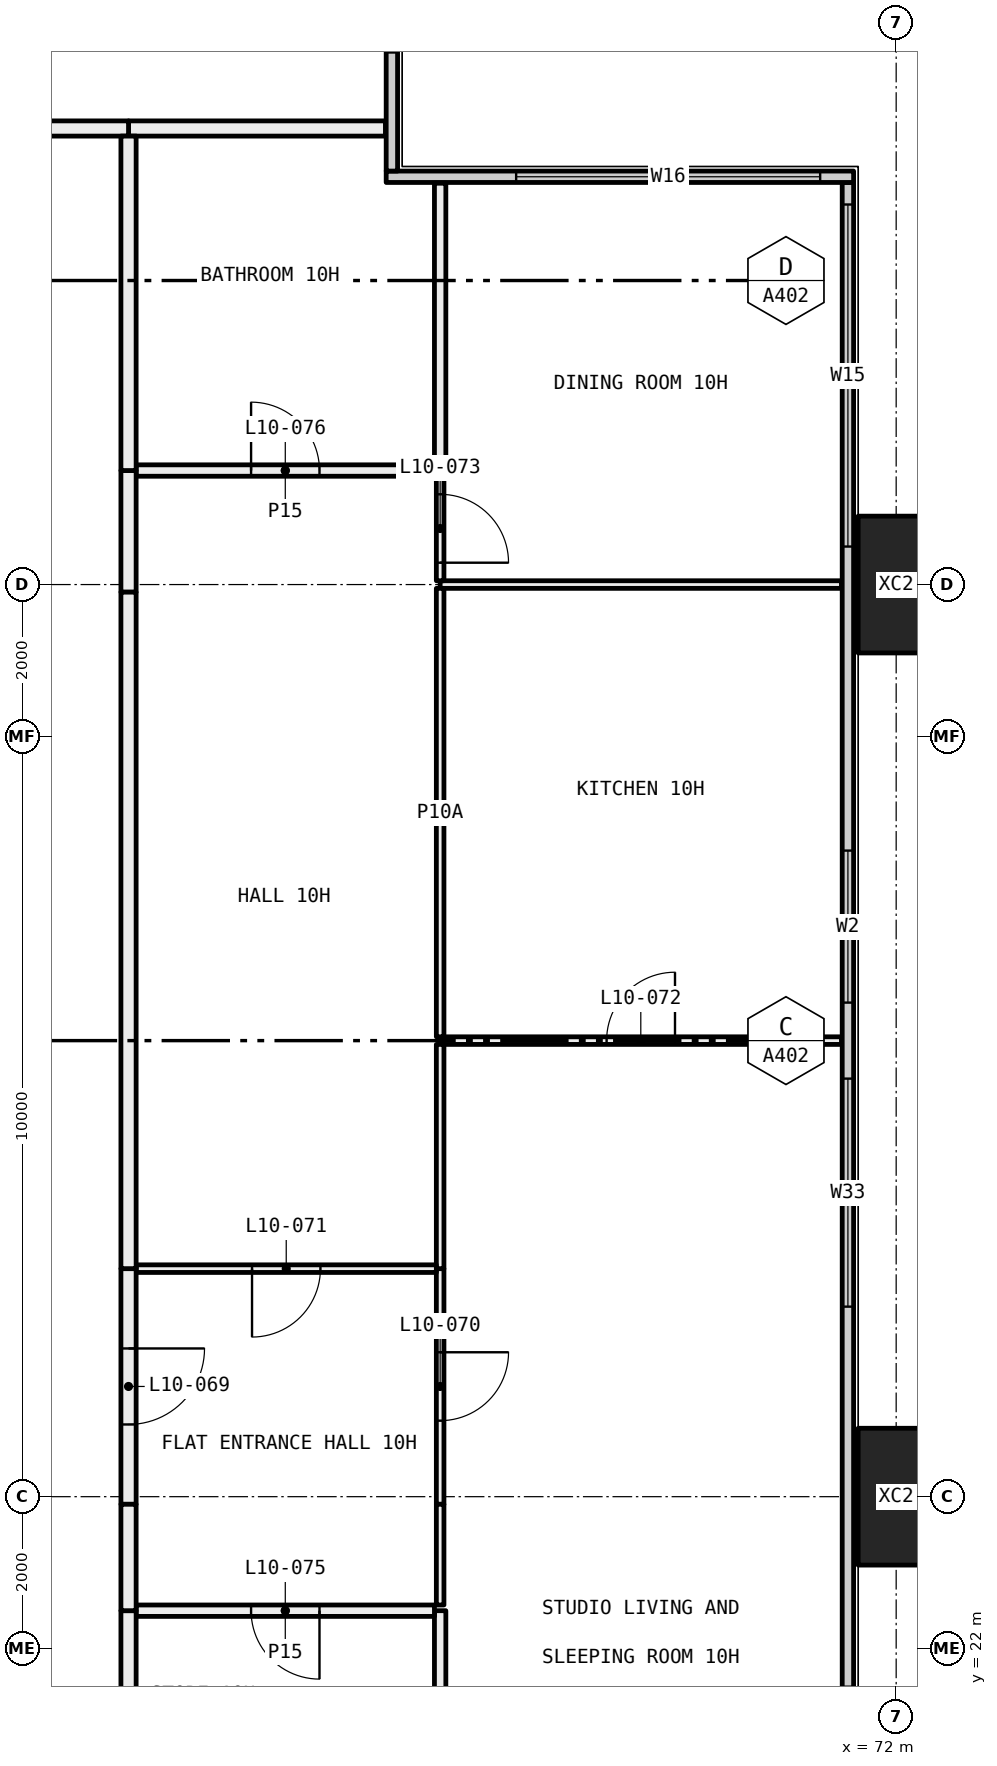
"""IFC4 building model, lengths in metres.
Left out: names, types, materials, properties, quantities, classifications, styles, units other than length and angle.
Written with IfcOpenShell. Run it as: python <this file> out.ifc"""

import sys

from ifc_helpers import new_model, si_unit, direction, frame, frame_2d, origin, origin_2d, place, context, subcontext, project, spatial, rectangle, hollow_rectangle, extrude, element, fill, save


model = new_model("IFC4")
c1 = context("Model", 3, precision=1e-05, world=origin(), true_north=direction((0.0, 1.0)))
c2 = subcontext(c1, "Body", "Model", "MODEL_VIEW")
j1 = project(units=[si_unit("LENGTHUNIT", "METRE"), si_unit("PLANEANGLEUNIT", "RADIAN")], contexts=[c1])
p1 = place(None, origin())
s1 = spatial("IfcSite", under=j1, at=p1, CompositionType="ELEMENT")
p2 = place(p1, origin())
s2 = spatial("IfcBuilding", under=s1, at=p2, CompositionType="ELEMENT")
p3 = place(p2, frame((0.0, 0.0, 47.25)))
s3 = spatial("IfcBuildingStorey", under=s2, at=p3, CompositionType="ELEMENT", Elevation=47.25)
for number, where, z_axis, x_axis in (
    (1, (72.0, 24.0, -0.4), (0.0, 0.0, 1.0), (0.0, 1.0, 0.0)),
    (2, (72.0, 36.0, -0.4), (0.0, 0.0, 1.0), (0.0, 1.0, 0.0)),
):
    element("IfcColumn", number, at=place(p3, frame(where, z_axis=z_axis, x_axis=x_axis)), inside=s3, PredefinedType="COLUMN", context=c2, shape_type="SweptSolid", body=[
        extrude(hollow_rectangle(XDim=1.8, YDim=1.0, WallThickness=0.07, at=origin_2d()), origin(), (0.0, 0.0, 1.0), 3.45),
    ])
p4 = place(p3, frame((71.365, 6.71, 0.0), z_axis=(0.0, 0.0, 1.0), x_axis=(0.0, 1.0, 0.0)))
e3 = element("IfcWall", 3, at=p4, inside=s3, PredefinedType="ELEMENTEDWALL", context=c2, shape_type="SweptSolid", body=[
    extrude(rectangle(XDim=34.58, YDim=0.15, at=frame_2d((17.29, 0.0))), origin(), (0.0, 0.0, 1.0), 3.05),
])
p5 = place(p4, frame((0.29, 0.0, 0.45)))
e4 = element("IfcOpeningElement", 4, at=p5, cuts=e3, PredefinedType="OPENING", context=c2, shape_type="SweptSolid", body=[
    extrude(rectangle(XDim=4.5, YDim=2.55, at=frame_2d((2.25, 1.275))), frame((0.0, 0.085, 0.0), z_axis=(0.0, -1.0, 0.0), x_axis=(1.0, 0.0, 0.0)), (0.0, 0.0, 1.0), 0.17),
])
p6 = place(p4, frame((7.79, 0.0, 0.45)))
e5 = element("IfcOpeningElement", 5, at=p6, cuts=e3, PredefinedType="OPENING", context=c2, shape_type="SweptSolid", body=[
    extrude(rectangle(XDim=3.0, YDim=2.55, at=frame_2d((1.5, 1.275))), frame((0.0, 0.085, 0.0), z_axis=(0.0, -1.0, 0.0), x_axis=(1.0, 0.0, 0.0)), (0.0, 0.0, 1.0), 0.17),
])
p7 = place(p4, frame((11.79, 0.0, 0.45)))
e6 = element("IfcOpeningElement", 6, at=p7, cuts=e3, PredefinedType="OPENING", context=c2, shape_type="SweptSolid", body=[
    extrude(rectangle(XDim=3.0, YDim=2.55, at=frame_2d((1.5, 1.275))), frame((0.0, 0.085, 0.0), z_axis=(0.0, -1.0, 0.0), x_axis=(1.0, 0.0, 0.0)), (0.0, 0.0, 1.0), 0.17),
])
p8 = place(p4, frame((19.79, 0.0, 0.45)))
e7 = element("IfcOpeningElement", 7, at=p8, cuts=e3, PredefinedType="OPENING", context=c2, shape_type="SweptSolid", body=[
    extrude(rectangle(XDim=3.0, YDim=2.55, at=frame_2d((1.5, 1.275))), frame((0.0, 0.085, 0.0), z_axis=(0.0, -1.0, 0.0), x_axis=(1.0, 0.0, 0.0)), (0.0, 0.0, 1.0), 0.17),
])
p9 = place(p4, frame((23.79, 0.0, 0.45)))
e8 = element("IfcOpeningElement", 8, at=p9, cuts=e3, PredefinedType="OPENING", context=c2, shape_type="SweptSolid", body=[
    extrude(rectangle(XDim=2.0, YDim=2.55, at=frame_2d((1.0, 1.275))), frame((0.0, 0.085, 0.0), z_axis=(0.0, -1.0, 0.0), x_axis=(1.0, 0.0, 0.0)), (0.0, 0.0, 1.0), 0.17),
])
p10 = place(p4, frame((29.79, 0.0, 0.45)))
e9 = element("IfcOpeningElement", 9, at=p10, cuts=e3, PredefinedType="OPENING", context=c2, shape_type="SweptSolid", body=[
    extrude(rectangle(XDim=4.5, YDim=2.55, at=frame_2d((2.25, 1.275))), frame((0.0, 0.085, 0.0), z_axis=(0.0, -1.0, 0.0), x_axis=(1.0, 0.0, 0.0)), (0.0, 0.0, 1.0), 0.17),
])
p11 = place(p3, frame((65.29, 41.365, 0.0), z_axis=(0.0, 0.0, 1.0), x_axis=(1.0, 0.0, 0.0)))
e10 = element("IfcWall", 10, at=p11, inside=s3, PredefinedType="ELEMENTEDWALL", context=c2, shape_type="SweptSolid", body=[
    extrude(rectangle(XDim=6.15, YDim=0.15, at=frame_2d((3.075, 0.0))), origin(), (0.0, 0.0, 1.0), 3.05),
])
p12 = place(p11, frame((1.71, 0.0, 0.45)))
e11 = element("IfcOpeningElement", 11, at=p12, cuts=e10, PredefinedType="OPENING", context=c2, shape_type="SweptSolid", body=[
    extrude(rectangle(XDim=4.0, YDim=2.55, at=frame_2d((2.0, 1.275))), frame((0.0, 0.085, 0.0), z_axis=(0.0, -1.0, 0.0), x_axis=(1.0, 0.0, 0.0)), (0.0, 0.0, 1.0), 0.17),
])
p13 = place(p3, frame((65.365, 41.44, 0.0), z_axis=(0.0, 0.0, 1.0), x_axis=(0.0, 1.0, 0.0)))
e12 = element("IfcWall", 12, at=p13, inside=s3, PredefinedType="ELEMENTEDWALL", context=c2, shape_type="SweptSolid", body=[
    extrude(rectangle(XDim=5.85, YDim=0.15, at=frame_2d((2.925, 0.0))), origin(), (0.0, 0.0, 1.0), 3.05),
])
p14 = place(p13, frame((1.56, 0.0, 0.45)))
e13 = element("IfcOpeningElement", 13, at=p14, cuts=e12, PredefinedType="OPENING", context=c2, shape_type="SweptSolid", body=[
    extrude(rectangle(XDim=4.0, YDim=2.55, at=frame_2d((2.0, 1.275))), frame((0.0, 0.085, 0.0), z_axis=(0.0, -1.0, 0.0), x_axis=(1.0, 0.0, 0.0)), (0.0, 0.0, 1.0), 0.17),
])
p15 = place(p3, frame((61.9, 42.0, 0.0), z_axis=(0.0, 0.0, 1.0), x_axis=(1.0, 0.0, 0.0)))
e14 = element("IfcWall", 14, at=p15, inside=s3, PredefinedType="PARTITIONING", context=c2, shape_type="SweptSolid", body=[
    extrude(rectangle(XDim=3.38, YDim=0.2, at=frame_2d((1.69, 0.0))), origin(), (0.0, 0.0, 1.0), 3.05),
])
p16 = place(p3, frame((60.0, 42.0, 0.0), z_axis=(0.0, 0.0, 1.0), x_axis=(1.0, 0.0, 0.0)))
e15 = element("IfcWall", 15, at=p16, inside=s3, PredefinedType="PARTITIONING", context=c2, shape_type="SweptSolid", body=[
    extrude(rectangle(XDim=1.9, YDim=0.2, at=frame_2d((0.95, 0.0))), origin(), (0.0, 0.0, 1.0), 3.05),
])
p17 = place(p3, frame((71.28, 30.0, 0.0), z_axis=(0.0, 0.0, 1.0), x_axis=(-1.0, 0.0, 0.0)))
e16 = element("IfcWall", 16, at=p17, inside=s3, PredefinedType="PARTITIONING", context=c2, shape_type="SweptSolid", body=[
    extrude(rectangle(XDim=5.28, YDim=0.1, at=frame_2d((2.64, 0.0))), origin(), (0.0, 0.0, 1.0), 3.05),
])
p18 = place(p17, frame((2.19, 0.0, 0.0)))
e17 = element("IfcOpeningElement", 17, at=p18, cuts=e16, PredefinedType="OPENING", context=c2, shape_type="SweptSolid", body=[
    extrude(rectangle(XDim=0.9, YDim=2.1, at=frame_2d((0.45, 1.05))), frame((0.0, 0.06, 0.0), z_axis=(0.0, -1.0, 0.0), x_axis=(1.0, 0.0, 0.0)), (0.0, 0.0, 1.0), 0.12),
])
p19 = place(p3, frame((66.0, 22.5, 0.0), z_axis=(0.0, 0.0, 1.0), x_axis=(0.0, -1.0, 0.0)))
e18 = element("IfcWall", 18, at=p19, inside=s3, PredefinedType="PARTITIONING", context=c2, shape_type="SweptSolid", body=[
    extrude(rectangle(XDim=2.1, YDim=0.15, at=frame_2d((1.05, 0.0))), origin(), (0.0, 0.0, 1.0), 3.05),
])
p20 = place(p3, frame((66.0, 27.0, 0.0), z_axis=(0.0, 0.0, 1.0), x_axis=(0.0, -1.0, 0.0)))
e19 = element("IfcWall", 19, at=p20, inside=s3, PredefinedType="PARTITIONING", context=c2, shape_type="SweptSolid", body=[
    extrude(rectangle(XDim=3.1, YDim=0.1, at=frame_2d((1.55, 0.0))), origin(), (0.0, 0.0, 1.0), 2.45),
])
p21 = place(p20, frame((1.1, 0.0, 0.0)))
e20 = element("IfcOpeningElement", 20, at=p21, cuts=e19, PredefinedType="OPENING", context=c2, shape_type="SweptSolid", body=[
    extrude(rectangle(XDim=0.9, YDim=2.1, at=frame_2d((0.45, 1.05))), frame((0.0, 0.06, 0.0), z_axis=(0.0, -1.0, 0.0), x_axis=(1.0, 0.0, 0.0)), (0.0, 0.0, 1.0), 0.12),
])
p22 = place(p3, frame((66.0, 23.9, 0.0), z_axis=(0.0, 0.0, 1.0), x_axis=(0.0, -1.0, 0.0)))
e21 = element("IfcWall", 21, at=p22, inside=s3, PredefinedType="PARTITIONING", context=c2, shape_type="SweptSolid", body=[
    extrude(rectangle(XDim=1.325, YDim=0.1, at=frame_2d((0.663, 0.0))), origin(), (0.0, 0.0, 1.0), 3.05),
])
p23 = place(p3, frame((66.0, 29.95, 0.0), z_axis=(0.0, 0.0, 1.0), x_axis=(0.0, -1.0, 0.0)))
e22 = element("IfcWall", 22, at=p23, inside=s3, PredefinedType="PARTITIONING", context=c2, shape_type="SweptSolid", body=[
    extrude(rectangle(XDim=2.95, YDim=0.1, at=frame_2d((1.475, 0.0))), origin(), (0.0, 0.0, 1.0), 3.05),
])
p24 = place(p3, frame((71.28, 36.0, 0.0), z_axis=(0.0, 0.0, 1.0), x_axis=(-1.0, 0.0, 0.0)))
e23 = element("IfcWall", 23, at=p24, inside=s3, PredefinedType="PARTITIONING", context=c2, shape_type="SweptSolid", body=[
    extrude(rectangle(XDim=5.28, YDim=0.1, at=frame_2d((2.64, 0.0))), origin(), (0.0, 0.0, 1.0), 2.45),
])
p25 = place(p3, frame((66.0, 35.95, 0.0), z_axis=(0.0, 0.0, 1.0), x_axis=(0.0, -1.0, 0.0)))
e24 = element("IfcWall", 24, at=p25, inside=s3, PredefinedType="PARTITIONING", context=c2, shape_type="SweptSolid", body=[
    extrude(rectangle(XDim=5.9, YDim=0.1, at=frame_2d((2.95, 0.0))), origin(), (0.0, 0.0, 1.0), 2.45),
])
p26 = place(p3, frame((66.0, 37.425, 0.0), z_axis=(0.0, 0.0, 1.0), x_axis=(0.0, -1.0, 0.0)))
e25 = element("IfcWall", 25, at=p26, inside=s3, PredefinedType="PARTITIONING", context=c2, shape_type="SweptSolid", body=[
    extrude(rectangle(XDim=1.375, YDim=0.1, at=frame_2d((0.688, 0.0))), origin(), (0.0, 0.0, 1.0), 2.45),
])
p27 = place(p26, frame((0.238, 0.0, 0.0)))
e26 = element("IfcOpeningElement", 26, at=p27, cuts=e25, PredefinedType="OPENING", context=c2, shape_type="SweptSolid", body=[
    extrude(rectangle(XDim=0.9, YDim=2.1, at=frame_2d((0.45, 1.05))), frame((0.0, 0.06, 0.0), z_axis=(0.0, -1.0, 0.0), x_axis=(1.0, 0.0, 0.0)), (0.0, 0.0, 1.0), 0.12),
])
p28 = place(p3, frame((66.0, 41.28, 0.0), z_axis=(0.0, 0.0, 1.0), x_axis=(0.0, -1.0, 0.0)))
e27 = element("IfcWall", 27, at=p28, inside=s3, PredefinedType="PARTITIONING", context=c2, shape_type="SweptSolid", body=[
    extrude(rectangle(XDim=3.78, YDim=0.15, at=frame_2d((1.89, 0.0))), origin(), (0.0, 0.0, 1.0), 3.05),
])
p29 = place(p3, frame((65.925, 22.5, 0.0), z_axis=(0.0, 0.0, 1.0), x_axis=(-1.0, 0.0, 0.0)))
e28 = element("IfcWall", 28, at=p29, inside=s3, PredefinedType="PARTITIONING", context=c2, shape_type="SweptSolid", body=[
    extrude(rectangle(XDim=3.925, YDim=0.15, at=frame_2d((1.962, 0.0))), origin(), (0.0, 0.0, 1.0), 3.05),
])
p30 = place(p29, frame((1.512, 0.0, 0.0)))
e29 = element("IfcOpeningElement", 29, at=p30, cuts=e28, PredefinedType="OPENING", context=c2, shape_type="SweptSolid", body=[
    extrude(rectangle(XDim=0.9, YDim=2.1, at=frame_2d((0.45, 1.05))), frame((0.0, 0.085, 0.0), z_axis=(0.0, -1.0, 0.0), x_axis=(1.0, 0.0, 0.0)), (0.0, 0.0, 1.0), 0.17),
])
p31 = place(p3, frame((61.9, 22.5, 0.0), z_axis=(0.0, 0.0, 1.0), x_axis=(0.0, -1.0, 0.0)))
e30 = element("IfcWall", 30, at=p31, inside=s3, PredefinedType="PARTITIONING", context=c2, shape_type="SweptSolid", body=[
    extrude(rectangle(XDim=2.1, YDim=0.2, at=frame_2d((1.05, 0.0))), origin(), (0.0, 0.0, 1.0), 3.05),
])
p32 = place(p3, frame((65.95, 27.0, 0.0), z_axis=(0.0, 0.0, 1.0), x_axis=(-1.0, 0.0, 0.0)))
e31 = element("IfcWall", 31, at=p32, inside=s3, PredefinedType="PARTITIONING", context=c2, shape_type="SweptSolid", body=[
    extrude(rectangle(XDim=3.95, YDim=0.1, at=frame_2d((1.975, 0.0))), origin(), (0.0, 0.0, 1.0), 3.05),
])
p33 = place(p32, frame((1.525, 0.0, 0.0)))
e32 = element("IfcOpeningElement", 32, at=p33, cuts=e31, PredefinedType="OPENING", context=c2, shape_type="SweptSolid", body=[
    extrude(rectangle(XDim=0.9, YDim=2.1, at=frame_2d((0.45, 1.05))), frame((0.0, 0.06, 0.0), z_axis=(0.0, -1.0, 0.0), x_axis=(1.0, 0.0, 0.0)), (0.0, 0.0, 1.0), 0.12),
])
p34 = place(p3, frame((61.9, 27.0, 0.0), z_axis=(0.0, 0.0, 1.0), x_axis=(0.0, -1.0, 0.0)))
e33 = element("IfcWall", 33, at=p34, inside=s3, PredefinedType="PARTITIONING", context=c2, shape_type="SweptSolid", body=[
    extrude(rectangle(XDim=3.1, YDim=0.2, at=frame_2d((1.55, 0.0))), origin(), (0.0, 0.0, 1.0), 2.45),
])
p35 = place(p34, frame((1.05, 0.0, 0.0)))
e34 = element("IfcOpeningElement", 34, at=p35, cuts=e33, PredefinedType="OPENING", context=c2, shape_type="SweptSolid", body=[
    extrude(rectangle(XDim=1.0, YDim=2.1, at=frame_2d((0.5, 1.05))), frame((0.0, 0.11, 0.0), z_axis=(0.0, -1.0, 0.0), x_axis=(1.0, 0.0, 0.0)), (0.0, 0.0, 1.0), 0.22),
])
p36 = place(p3, frame((61.9, 23.9, 0.0), z_axis=(0.0, 0.0, 1.0), x_axis=(0.0, -1.0, 0.0)))
e35 = element("IfcWall", 35, at=p36, inside=s3, PredefinedType="PARTITIONING", context=c2, shape_type="SweptSolid", body=[
    extrude(rectangle(XDim=1.4, YDim=0.2, at=frame_2d((0.7, 0.0))), origin(), (0.0, 0.0, 1.0), 3.05),
])
p37 = place(p3, frame((65.925, 37.5, 0.0), z_axis=(0.0, 0.0, 1.0), x_axis=(-1.0, 0.0, 0.0)))
e36 = element("IfcWall", 36, at=p37, inside=s3, PredefinedType="PARTITIONING", context=c2, shape_type="SweptSolid", body=[
    extrude(rectangle(XDim=3.925, YDim=0.15, at=frame_2d((1.962, 0.0))), origin(), (0.0, 0.0, 1.0), 3.05),
])
p38 = place(p37, frame((1.512, 0.0, 0.0)))
e37 = element("IfcOpeningElement", 37, at=p38, cuts=e36, PredefinedType="OPENING", context=c2, shape_type="SweptSolid", body=[
    extrude(rectangle(XDim=0.9, YDim=2.1, at=frame_2d((0.45, 1.05))), frame((0.0, 0.085, 0.0), z_axis=(0.0, -1.0, 0.0), x_axis=(1.0, 0.0, 0.0)), (0.0, 0.0, 1.0), 0.17),
])
p39 = place(p3, frame((61.9, 37.5, 0.0), z_axis=(0.0, 0.0, 1.0), x_axis=(0.0, -1.0, 0.0)))
e38 = element("IfcWall", 38, at=p39, inside=s3, PredefinedType="PARTITIONING", context=c2, shape_type="SweptSolid", body=[
    extrude(rectangle(XDim=1.6, YDim=0.2, at=frame_2d((0.8, 0.0))), origin(), (0.0, 0.0, 1.0), 2.45),
])
p40 = place(p3, frame((61.9, 35.9, 0.0), z_axis=(0.0, 0.0, 1.0), x_axis=(0.0, -1.0, 0.0)))
e39 = element("IfcWall", 39, at=p40, inside=s3, PredefinedType="PARTITIONING", context=c2, shape_type="SweptSolid", body=[
    extrude(rectangle(XDim=8.9, YDim=0.2, at=frame_2d((4.45, 0.0))), origin(), (0.0, 0.0, 1.0), 3.05),
])
p41 = place(p3, frame((61.9, 41.9, 0.0), z_axis=(0.0, 0.0, 1.0), x_axis=(0.0, -1.0, 0.0)))
e40 = element("IfcWall", 40, at=p41, inside=s3, PredefinedType="PARTITIONING", context=c2, shape_type="SweptSolid", body=[
    extrude(rectangle(XDim=4.4, YDim=0.2, at=frame_2d((2.2, 0.0))), origin(), (0.0, 0.0, 1.0), 3.05),
])
p42 = place(p8, origin())
e41 = element("IfcWindow", 41, at=p42, inside=s3, PartitioningType="SINGLE_PANEL", PredefinedType="WINDOW", context=c2, shape_type="SweptSolid", body=[
    extrude(rectangle(XDim=3.0, YDim=2.55, at=frame_2d((1.5, 1.275))), frame((0.0, 0.03, 0.0), z_axis=(0.0, -1.0, 0.0), x_axis=(1.0, 0.0, 0.0)), (0.0, 0.0, 1.0), 0.06),
])
fill(e7, e41)
p43 = place(p9, origin())
e42 = element("IfcWindow", 42, at=p43, inside=s3, PartitioningType="SINGLE_PANEL", PredefinedType="WINDOW", context=c2, shape_type="SweptSolid", body=[
    extrude(rectangle(XDim=2.0, YDim=2.55, at=frame_2d((1.0, 1.275))), frame((0.0, 0.03, 0.0), z_axis=(0.0, -1.0, 0.0), x_axis=(1.0, 0.0, 0.0)), (0.0, 0.0, 1.0), 0.06),
])
fill(e8, e42)
p44 = place(p10, origin())
e43 = element("IfcWindow", 43, at=p44, inside=s3, PartitioningType="SINGLE_PANEL", PredefinedType="WINDOW", context=c2, shape_type="SweptSolid", body=[
    extrude(rectangle(XDim=4.5, YDim=2.55, at=frame_2d((2.25, 1.275))), frame((0.0, 0.03, 0.0), z_axis=(0.0, -1.0, 0.0), x_axis=(1.0, 0.0, 0.0)), (0.0, 0.0, 1.0), 0.06),
])
fill(e9, e43)
p45 = place(p12, origin())
e44 = element("IfcWindow", 44, at=p45, inside=s3, PartitioningType="SINGLE_PANEL", PredefinedType="WINDOW", context=c2, shape_type="SweptSolid", body=[
    extrude(rectangle(XDim=4.0, YDim=2.55, at=frame_2d((2.0, 1.275))), frame((0.0, 0.03, 0.0), z_axis=(0.0, -1.0, 0.0), x_axis=(1.0, 0.0, 0.0)), (0.0, 0.0, 1.0), 0.06),
])
fill(e11, e44)
p46 = place(p35, origin())
e45 = element("IfcDoor", 45, at=p46, inside=s3, OperationType="SINGLE_SWING_RIGHT", PredefinedType="DOOR", context=c2, shape_type="SweptSolid", body=[
    extrude(rectangle(XDim=1.0, YDim=2.1, at=frame_2d((0.5, 1.05))), frame((0.0, 0.025, 0.0), z_axis=(0.0, -1.0, 0.0), x_axis=(1.0, 0.0, 0.0)), (0.0, 0.0, 1.0), 0.05),
])
fill(e34, e45)
p47 = place(p21, origin())
e46 = element("IfcDoor", 46, at=p47, inside=s3, OperationType="SINGLE_SWING_RIGHT", PredefinedType="DOOR", context=c2, shape_type="SweptSolid", body=[
    extrude(rectangle(XDim=0.9, YDim=2.1, at=frame_2d((0.45, 1.05))), frame((0.0, 0.025, 0.0), z_axis=(0.0, -1.0, 0.0), x_axis=(1.0, 0.0, 0.0)), (0.0, 0.0, 1.0), 0.05),
])
fill(e20, e46)
p48 = place(p33, origin())
e47 = element("IfcDoor", 47, at=p48, inside=s3, OperationType="SINGLE_SWING_LEFT", PredefinedType="DOOR", context=c2, shape_type="SweptSolid", body=[
    extrude(rectangle(XDim=0.9, YDim=2.1, at=frame_2d((0.45, 1.05))), frame((0.0, 0.025, 0.0), z_axis=(0.0, -1.0, 0.0), x_axis=(1.0, 0.0, 0.0)), (0.0, 0.0, 1.0), 0.05),
])
fill(e32, e47)
p49 = place(p18, frame((0.9, 0.0, 0.0), x_axis=(-1.0, 0.0, 0.0)))
e48 = element("IfcDoor", 48, at=p49, inside=s3, OperationType="SINGLE_SWING_LEFT", PredefinedType="DOOR", context=c2, shape_type="SweptSolid", body=[
    extrude(rectangle(XDim=0.9, YDim=2.1, at=frame_2d((0.45, 1.05))), frame((0.0, 0.025, 0.0), z_axis=(0.0, -1.0, 0.0), x_axis=(1.0, 0.0, 0.0)), (0.0, 0.0, 1.0), 0.05),
])
fill(e17, e48)
p50 = place(p27, origin())
e49 = element("IfcDoor", 49, at=p50, inside=s3, OperationType="SINGLE_SWING_LEFT", PredefinedType="DOOR", context=c2, shape_type="SweptSolid", body=[
    extrude(rectangle(XDim=0.9, YDim=2.1, at=frame_2d((0.45, 1.05))), frame((0.0, 0.025, 0.0), z_axis=(0.0, -1.0, 0.0), x_axis=(1.0, 0.0, 0.0)), (0.0, 0.0, 1.0), 0.05),
])
fill(e26, e49)
p51 = place(p30, origin())
e50 = element("IfcDoor", 50, at=p51, inside=s3, OperationType="SINGLE_SWING_RIGHT", PredefinedType="DOOR", context=c2, shape_type="SweptSolid", body=[
    extrude(rectangle(XDim=0.9, YDim=2.1, at=frame_2d((0.45, 1.05))), frame((0.0, 0.025, 0.0), z_axis=(0.0, -1.0, 0.0), x_axis=(1.0, 0.0, 0.0)), (0.0, 0.0, 1.0), 0.05),
])
fill(e29, e50)
p52 = place(p38, frame((0.9, 0.0, 0.0), x_axis=(-1.0, 0.0, 0.0)))
e51 = element("IfcDoor", 51, at=p52, inside=s3, OperationType="SINGLE_SWING_RIGHT", PredefinedType="DOOR", context=c2, shape_type="SweptSolid", body=[
    extrude(rectangle(XDim=0.9, YDim=2.1, at=frame_2d((0.45, 1.05))), frame((0.0, 0.025, 0.0), z_axis=(0.0, -1.0, 0.0), x_axis=(1.0, 0.0, 0.0)), (0.0, 0.0, 1.0), 0.05),
])
fill(e37, e51)
save(model, sys.argv[1])
